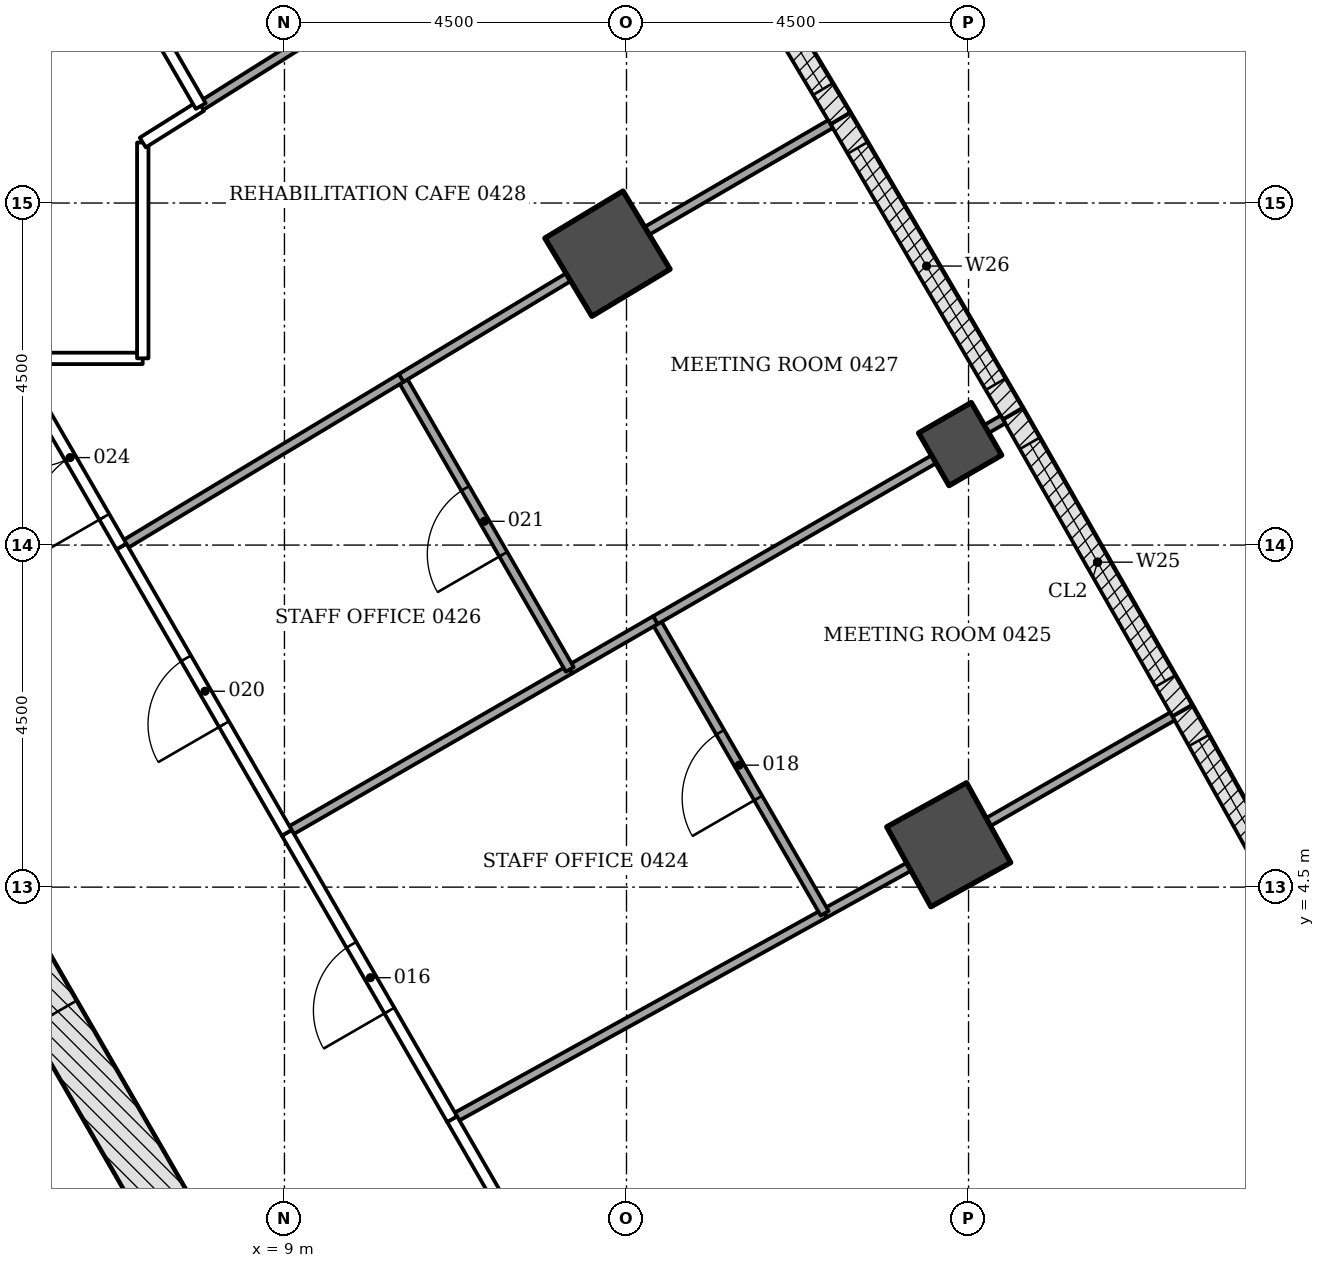
"""IFC4 building model, lengths in metres.
Left out: names, types, materials, properties, quantities, classifications, styles, units other than length and angle.
Written with IfcOpenShell. Run it as: python <this file> out.ifc"""

import sys

from ifc_helpers import new_model, si_unit, direction, frame, frame_2d, origin, origin_2d, place, context, subcontext, project, spatial, rectangle, extrude, element, fill, save


model = new_model("IFC4")
c1 = context("Model", 3, precision=1e-05, world=origin(), true_north=direction((0.0, 1.0)))
c2 = subcontext(c1, "Body", "Model", "MODEL_VIEW")
j1 = project(units=[si_unit("LENGTHUNIT", "METRE"), si_unit("PLANEANGLEUNIT", "RADIAN")], contexts=[c1])
p1 = place(None, origin())
s1 = spatial("IfcSite", under=j1, at=p1, CompositionType="ELEMENT")
p2 = place(p1, origin())
s2 = spatial("IfcBuilding", under=s1, at=p2, CompositionType="ELEMENT")
p3 = place(p2, frame((0.0, 0.0, 19.5)))
s3 = spatial("IfcBuildingStorey", under=s2, at=p3, CompositionType="ELEMENT", Elevation=19.5)
for number, where, z_axis, x_axis in (
    (1, (17.739, 5.058, -0.25), (0.0, 0.0, 1.0), (0.875, 0.484, 0.0)),
    (2, (13.25, 12.834, -0.25), (0.0, 0.0, 1.0), (0.857, 0.516, 0.0)),
):
    element("IfcColumn", number, at=place(p3, frame(where, z_axis=z_axis, x_axis=x_axis)), inside=s3, PredefinedType="COLUMN", context=c2, shape_type="SweptSolid", body=[
        extrude(rectangle(XDim=1.2, YDim=1.2, at=origin_2d()), origin(), (0.0, 0.0, 1.0), 4.55),
    ])
p4 = place(p3, frame((17.89, 10.329, -0.25), z_axis=(0.0, 0.0, 1.0), x_axis=(0.866025403784, 0.5, 0.0)))
e3 = element("IfcColumn", 3, at=p4, inside=s3, PredefinedType="COLUMN", context=c2, shape_type="SweptSolid", body=[
    extrude(rectangle(XDim=0.8, YDim=0.8, at=origin_2d()), origin(), (0.0, 0.0, 1.0), 4.55),
])
p5 = place(p3, frame((10.311, -4.703, -0.25), z_axis=(0.0, 0.0, 1.0), x_axis=(-0.500001446645, 0.866024568562, 0.0)))
e4 = element("IfcWall", 4, at=p5, inside=s3, PredefinedType="SHEAR", context=c2, shape_type="SweptSolid", body=[
    extrude(rectangle(XDim=18.458, YDim=0.7, at=frame_2d((9.229, 0.0))), origin(), (0.0, 0.0, 1.0), 4.55),
])
p6 = place(p5, frame((8.7, 0.0, 0.25)))
e5 = element("IfcOpeningElement", 5, at=p6, cuts=e4, PredefinedType="OPENING", context=c2, shape_type="SweptSolid", body=[
    extrude(rectangle(XDim=1.0, YDim=2.1, at=frame_2d((0.5, 1.05))), frame((0.0, 0.36, 0.0), z_axis=(0.0, -1.0, 0.0), x_axis=(1.0, 0.0, 0.0)), (0.0, 0.0, 1.0), 0.72),
])
p7 = place(p5, frame((4.002, 0.0, 0.25)))
e6 = element("IfcOpeningElement", 6, at=p7, cuts=e4, PredefinedType="OPENING", context=c2, shape_type="SweptSolid", body=[
    extrude(rectangle(XDim=0.9, YDim=2.1, at=frame_2d((0.45, 1.05))), frame((0.0, 0.36, 0.0), z_axis=(0.0, -1.0, 0.0), x_axis=(1.0, 0.0, 0.0)), (0.0, 0.0, 1.0), 0.72),
])
p8 = place(p5, frame((14.093, 0.0, 0.25)))
e7 = element("IfcOpeningElement", 7, at=p8, cuts=e4, PredefinedType="OPENING", context=c2, shape_type="SweptSolid", body=[
    extrude(rectangle(XDim=0.9, YDim=2.1, at=frame_2d((0.45, 1.05))), frame((0.0, 0.36, 0.0), z_axis=(0.0, -1.0, 0.0), x_axis=(1.0, 0.0, 0.0)), (0.0, 0.0, 1.0), 0.72),
])
p9 = place(p3, frame((20.812, 6.82, 0.0), z_axis=(0.0, 0.0, 1.0), x_axis=(0.486606252415, -0.873621402617, 0.0)))
e8 = element("IfcWall", 8, at=p9, inside=s3, PredefinedType="NOTDEFINED", context=c2, shape_type="SweptSolid", body=[
    extrude(rectangle(XDim=4.496, YDim=0.3, at=frame_2d((2.248, 0.0))), origin(), (0.0, 0.0, 1.0), 4.3),
])
p10 = place(p9, frame((0.448, 0.0, 1.5)))
e9 = element("IfcOpeningElement", 9, at=p10, cuts=e8, PredefinedType="OPENING", context=c2, shape_type="SweptSolid", body=[
    extrude(rectangle(XDim=3.6, YDim=1.8, at=frame_2d((1.8, 0.9))), frame((0.0, 0.16, 0.0), z_axis=(0.0, -1.0, 0.0), x_axis=(1.0, 0.0, 0.0)), (0.0, 0.0, 1.0), 0.32),
])
p11 = place(p3, frame((18.583, 10.728, 0.0), z_axis=(0.0, 0.0, 1.0), x_axis=(0.495524760411, -0.868593812907, 0.0)))
e10 = element("IfcWall", 10, at=p11, inside=s3, PredefinedType="NOTDEFINED", context=c2, shape_type="SweptSolid", body=[
    extrude(rectangle(XDim=4.496, YDim=0.3, at=frame_2d((2.248, 0.0))), origin(), (0.0, 0.0, 1.0), 4.3),
])
p12 = place(p11, frame((0.448, 0.0, 1.5)))
e11 = element("IfcOpeningElement", 11, at=p12, cuts=e10, PredefinedType="OPENING", context=c2, shape_type="SweptSolid", body=[
    extrude(rectangle(XDim=3.6, YDim=1.8, at=frame_2d((1.8, 0.9))), frame((0.0, 0.16, 0.0), z_axis=(0.0, -1.0, 0.0), x_axis=(1.0, 0.0, 0.0)), (0.0, 0.0, 1.0), 0.32),
])
p13 = place(p3, frame((16.314, 14.612, 0.0), z_axis=(0.0, 0.0, 1.0), x_axis=(0.50445499627, -0.86343798662, 0.0)))
e12 = element("IfcWall", 12, at=p13, inside=s3, PredefinedType="NOTDEFINED", context=c2, shape_type="SweptSolid", body=[
    extrude(rectangle(XDim=4.496, YDim=0.3, at=frame_2d((2.248, 0.0))), origin(), (0.0, 0.0, 1.0), 4.3),
])
p14 = place(p13, frame((0.448, 0.0, 1.5)))
e13 = element("IfcOpeningElement", 13, at=p14, cuts=e12, PredefinedType="OPENING", context=c2, shape_type="SweptSolid", body=[
    extrude(rectangle(XDim=3.6, YDim=1.8, at=frame_2d((1.8, 0.9))), frame((0.0, 0.16, 0.0), z_axis=(0.0, -1.0, 0.0), x_axis=(1.0, 0.0, 0.0)), (0.0, 0.0, 1.0), 0.32),
])
p15 = place(p3, frame((14.005, 18.472, 0.0), z_axis=(0.0, 0.0, 1.0), x_axis=(0.513257465408, -0.858234684805, 0.0)))
e14 = element("IfcWall", 14, at=p15, inside=s3, PredefinedType="NOTDEFINED", context=c2, shape_type="SweptSolid", body=[
    extrude(rectangle(XDim=4.496, YDim=0.3, at=frame_2d((2.248, 0.0))), origin(), (0.0, 0.0, 1.0), 4.3),
])
p16 = place(p15, frame((0.448, 0.0, 1.5)))
e15 = element("IfcOpeningElement", 15, at=p16, cuts=e14, PredefinedType="OPENING", context=c2, shape_type="SweptSolid", body=[
    extrude(rectangle(XDim=3.6, YDim=1.8, at=frame_2d((1.8, 0.9))), frame((0.0, 0.16, 0.0), z_axis=(0.0, -1.0, 0.0), x_axis=(1.0, 0.0, 0.0)), (0.0, 0.0, 1.0), 0.32),
])
p17 = place(p3, frame((11.205, 1.45, 0.0), z_axis=(0.0, 0.0, 1.0), x_axis=(0.500008243208, -0.866020644514, 0.0)))
e16 = element("IfcWall", 16, at=p17, inside=s3, PredefinedType="PARTITIONING", context=c2, shape_type="SweptSolid", body=[
    extrude(rectangle(XDim=6.902, YDim=0.15, at=frame_2d((3.451, 0.0))), origin(), (0.0, 0.0, 1.0), 3.698),
])
p18 = place(p17, frame((2.55, 0.0, 0.0)))
e17 = element("IfcOpeningElement", 17, at=p18, cuts=e16, PredefinedType="OPENING", context=c2, shape_type="SweptSolid", body=[
    extrude(rectangle(XDim=1.8, YDim=2.1, at=frame_2d((0.9, 1.05))), frame((0.0, 0.085, 0.0), z_axis=(0.0, -1.0, 0.0), x_axis=(1.0, 0.0, 0.0)), (0.0, 0.0, 1.0), 0.17),
])
p19 = place(p3, frame((16.108, 4.155, 0.0), z_axis=(0.0, 0.0, 1.0), x_axis=(-0.875228903622, -0.483708968559, 0.0)))
e18 = element("IfcWall", 18, at=p19, inside=s3, PredefinedType="PARTITIONING", context=c2, shape_type="SweptSolid", body=[
    extrude(rectangle(XDim=5.598, YDim=0.12, at=frame_2d((2.799, 0.0))), origin(), (0.0, 0.0, 1.0), 3.698),
])
p20 = place(p3, frame((17.214, 4.767, 0.0), z_axis=(0.0, 0.0, 1.0), x_axis=(-0.875140294724, -0.483869263904, 0.0)))
e19 = element("IfcWall", 19, at=p20, inside=s3, PredefinedType="PARTITIONING", context=c2, shape_type="SweptSolid", body=[
    extrude(rectangle(XDim=1.263, YDim=0.12, at=frame_2d((0.631, 0.0))), origin(), (0.0, 0.0, 1.0), 3.698),
])
p21 = place(p3, frame((20.682, 6.746, 0.0), z_axis=(0.0, 0.0, 1.0), x_axis=(-0.867283853893, -0.49781393791, 0.0)))
e20 = element("IfcWall", 20, at=p21, inside=s3, PredefinedType="PARTITIONING", context=c2, shape_type="SweptSolid", body=[
    extrude(rectangle(XDim=2.792, YDim=0.12, at=frame_2d((1.396, 0.0))), origin(), (0.0, 0.0, 1.0), 3.683),
])
p22 = place(p3, frame((11.206, 1.447, 0.0), z_axis=(0.0, 0.0, 1.0), x_axis=(-0.50014197282, 0.865943420221, 0.0)))
e21 = element("IfcWall", 21, at=p22, inside=s3, PredefinedType="PARTITIONING", context=c2, shape_type="SweptSolid", body=[
    extrude(rectangle(XDim=4.349, YDim=0.15, at=frame_2d((2.174, 0.0))), origin(), (0.0, 0.0, 1.0), 3.688),
])
p23 = place(p22, frame((1.65, 0.0, 0.0)))
e22 = element("IfcOpeningElement", 22, at=p23, cuts=e21, PredefinedType="OPENING", context=c2, shape_type="SweptSolid", body=[
    extrude(rectangle(XDim=1.0, YDim=2.1, at=frame_2d((0.5, 1.05))), frame((0.0, 0.085, 0.0), z_axis=(0.0, -1.0, 0.0), x_axis=(1.0, 0.0, 0.0)), (0.0, 0.0, 1.0), 0.17),
])
p24 = place(p3, frame((9.03, 5.215, 0.0), z_axis=(0.0, 0.0, 1.0), x_axis=(-0.500070818246, 0.86598451299, 0.0)))
e23 = element("IfcWall", 23, at=p24, inside=s3, PredefinedType="PARTITIONING", context=c2, shape_type="SweptSolid", body=[
    extrude(rectangle(XDim=4.347, YDim=0.15, at=frame_2d((2.174, 0.0))), origin(), (0.0, 0.0, 1.0), 3.688),
])
p25 = place(p24, frame((1.65, 0.0, 0.0)))
e24 = element("IfcOpeningElement", 24, at=p25, cuts=e23, PredefinedType="OPENING", context=c2, shape_type="SweptSolid", body=[
    extrude(rectangle(XDim=1.0, YDim=2.1, at=frame_2d((0.5, 1.05))), frame((0.0, 0.085, 0.0), z_axis=(0.0, -1.0, 0.0), x_axis=(1.0, 0.0, 0.0)), (0.0, 0.0, 1.0), 0.17),
])
p26 = place(p3, frame((6.855, 8.982, 0.0), z_axis=(0.0, 0.0, 1.0), x_axis=(-0.500176439337, 0.865923512519, 0.0)))
e25 = element("IfcWall", 25, at=p26, inside=s3, PredefinedType="PARTITIONING", context=c2, shape_type="SweptSolid", body=[
    extrude(rectangle(XDim=2.855, YDim=0.15, at=frame_2d((1.427, 0.0))), origin(), (0.0, 0.0, 1.0), 3.698),
])
p27 = place(p26, frame((0.45, 0.0, 0.0)))
e26 = element("IfcOpeningElement", 26, at=p27, cuts=e25, PredefinedType="OPENING", context=c2, shape_type="SweptSolid", body=[
    extrude(rectangle(XDim=1.8, YDim=2.1, at=frame_2d((0.9, 1.05))), frame((0.0, 0.085, 0.0), z_axis=(0.0, -1.0, 0.0), x_axis=(1.0, 0.0, 0.0)), (0.0, 0.0, 1.0), 0.17),
])
p28 = place(p3, frame((5.427, 11.456, 0.0), z_axis=(0.0, 0.0, 1.0), x_axis=(1.0, 0.0, 0.0)))
e27 = element("IfcWall", 27, at=p28, inside=s3, PredefinedType="PARTITIONING", context=c2, shape_type="SweptSolid", body=[
    extrude(rectangle(XDim=1.708, YDim=0.15, at=frame_2d((0.854, 0.0))), origin(), (0.0, 0.0, 1.0), 4.3),
])
p29 = place(p3, frame((7.136, 11.457, 0.0), z_axis=(0.0, 0.0, 1.0), x_axis=(0.0, 1.0, 0.0)))
e28 = element("IfcWall", 28, at=p29, inside=s3, PredefinedType="PARTITIONING", context=c2, shape_type="SweptSolid", body=[
    extrude(rectangle(XDim=2.839, YDim=0.15, at=frame_2d((1.419, 0.0))), origin(), (0.0, 0.0, 1.0), 3.843),
])
p30 = place(p3, frame((7.136, 14.296, 0.0), z_axis=(0.0, 0.0, 1.0), x_axis=(0.84681367047, 0.531889657265, 0.0)))
e29 = element("IfcWall", 29, at=p30, inside=s3, PredefinedType="PARTITIONING", context=c2, shape_type="SweptSolid", body=[
    extrude(rectangle(XDim=0.905, YDim=0.15, at=frame_2d((0.452, 0.0))), origin(), (0.0, 0.0, 1.0), 3.843),
])
p31 = place(p3, frame((7.899, 14.776, 0.0), z_axis=(0.0, 0.0, 1.0), x_axis=(-0.500392307633, 0.865798786359, 0.0)))
e30 = element("IfcWall", 30, at=p31, inside=s3, PredefinedType="PARTITIONING", context=c2, shape_type="SweptSolid", body=[
    extrude(rectangle(XDim=1.525, YDim=0.15, at=frame_2d((0.762, 0.0))), origin(), (0.0, 0.0, 1.0), 3.843),
])
p32 = place(p3, frame((16.107, 4.156, 0.0), z_axis=(0.0, 0.0, 1.0), x_axis=(-0.499836357881, 0.866119861994, 0.0)))
e31 = element("IfcWall", 31, at=p32, inside=s3, PredefinedType="PARTITIONING", context=c2, shape_type="SweptSolid", body=[
    extrude(rectangle(XDim=4.453, YDim=0.12, at=frame_2d((2.227, 0.0))), origin(), (0.0, 0.0, 1.0), 3.688),
])
p33 = place(p32, frame((1.75, 0.0, 0.0)))
e32 = element("IfcOpeningElement", 32, at=p33, cuts=e31, PredefinedType="OPENING", context=c2, shape_type="SweptSolid", body=[
    extrude(rectangle(XDim=1.0, YDim=2.1, at=frame_2d((0.5, 1.05))), frame((0.0, 0.07, 0.0), z_axis=(0.0, -1.0, 0.0), x_axis=(1.0, 0.0, 0.0)), (0.0, 0.0, 1.0), 0.14),
])
p34 = place(p3, frame((12.755, 7.363, 0.0), z_axis=(0.0, 0.0, 1.0), x_axis=(-0.866173292352, -0.499743761959, 0.0)))
e33 = element("IfcWall", 33, at=p34, inside=s3, PredefinedType="PARTITIONING", context=c2, shape_type="SweptSolid", body=[
    extrude(rectangle(XDim=4.298, YDim=0.12, at=frame_2d((2.149, 0.0))), origin(), (0.0, 0.0, 1.0), 3.688),
])
p35 = place(p3, frame((13.881, 8.013, 0.0), z_axis=(0.0, 0.0, 1.0), x_axis=(-0.866223138365, -0.499657357156, 0.0)))
e34 = element("IfcWall", 34, at=p35, inside=s3, PredefinedType="PARTITIONING", context=c2, shape_type="SweptSolid", body=[
    extrude(rectangle(XDim=1.299, YDim=0.12, at=frame_2d((0.649, 0.0))), origin(), (0.0, 0.0, 1.0), 3.688),
])
p36 = place(p3, frame((17.543, 10.128, 0.0), z_axis=(0.0, 0.0, 1.0), x_axis=(-0.865942311451, -0.500143892533, 0.0)))
e35 = element("IfcWall", 35, at=p36, inside=s3, PredefinedType="PARTITIONING", context=c2, shape_type="SweptSolid", body=[
    extrude(rectangle(XDim=4.229, YDim=0.12, at=frame_2d((2.114, 0.0))), origin(), (0.0, 0.0, 1.0), 3.18),
])
p37 = place(p3, frame((18.454, 10.653, 0.0), z_axis=(0.0, 0.0, 1.0), x_axis=(-0.866558586415, -0.499075361355, 0.0)))
e36 = element("IfcWall", 36, at=p37, inside=s3, PredefinedType="PARTITIONING", context=c2, shape_type="SweptSolid", body=[
    extrude(rectangle(XDim=0.25, YDim=0.12, at=frame_2d((0.125, 0.0))), origin(), (0.0, 0.0, 1.0), 4.3),
])
p38 = place(p3, frame((12.754, 7.364, 0.0), z_axis=(0.0, 0.0, 1.0), x_axis=(-0.499862428325, 0.86610481626, 0.0)))
e37 = element("IfcWall", 37, at=p38, inside=s3, PredefinedType="PARTITIONING", context=c2, shape_type="SweptSolid", body=[
    extrude(rectangle(XDim=4.429, YDim=0.12, at=frame_2d((2.214, 0.0))), origin(), (0.0, 0.0, 1.0), 3.688),
])
p39 = place(p38, frame((1.75, 0.0, 0.0)))
e38 = element("IfcOpeningElement", 38, at=p39, cuts=e37, PredefinedType="OPENING", context=c2, shape_type="SweptSolid", body=[
    extrude(rectangle(XDim=1.0, YDim=2.1, at=frame_2d((0.5, 1.05))), frame((0.0, 0.07, 0.0), z_axis=(0.0, -1.0, 0.0), x_axis=(1.0, 0.0, 0.0)), (0.0, 0.0, 1.0), 0.14),
])
p40 = place(p3, frame((10.544, 11.203, 0.0), z_axis=(0.0, 0.0, 1.0), x_axis=(-0.85659577265, -0.515988064084, 0.0)))
e39 = element("IfcWall", 39, at=p40, inside=s3, PredefinedType="PARTITIONING", context=c2, shape_type="SweptSolid", body=[
    extrude(rectangle(XDim=4.304, YDim=0.12, at=frame_2d((2.152, 0.0))), origin(), (0.0, 0.0, 1.0), 3.698),
])
p41 = place(p3, frame((12.736, 12.524, 0.0), z_axis=(0.0, 0.0, 1.0), x_axis=(-0.85666145055, -0.515879015993, 0.0)))
e40 = element("IfcWall", 40, at=p41, inside=s3, PredefinedType="PARTITIONING", context=c2, shape_type="SweptSolid", body=[
    extrude(rectangle(XDim=2.568, YDim=0.12, at=frame_2d((1.284, 0.0))), origin(), (0.0, 0.0, 1.0), 3.698),
])
p42 = place(p3, frame((16.183, 14.538, 0.0), z_axis=(0.0, 0.0, 1.0), x_axis=(-0.864576979504, -0.50250039454, 0.0)))
e41 = element("IfcWall", 41, at=p42, inside=s3, PredefinedType="PARTITIONING", context=c2, shape_type="SweptSolid", body=[
    extrude(rectangle(XDim=2.792, YDim=0.12, at=frame_2d((1.396, 0.0))), origin(), (0.0, 0.0, 1.0), 3.683),
])
p43 = place(p3, frame((10.898, 16.658, 0.0), z_axis=(0.0, 0.0, 1.0), x_axis=(-0.846864700387, -0.531808404634, 0.0)))
e42 = element("IfcWall", 42, at=p43, inside=s3, PredefinedType="PARTITIONING", context=c2, shape_type="SweptSolid", body=[
    extrude(rectangle(XDim=3.539, YDim=0.12, at=frame_2d((1.77, 0.0))), origin(), (0.0, 0.0, 1.0), 3.18),
])
p44 = place(p10, origin())
e43 = element("IfcWindow", 43, at=p44, inside=s3, PartitioningType="SINGLE_PANEL", PredefinedType="WINDOW", context=c2, shape_type="SweptSolid", body=[
    extrude(rectangle(XDim=3.6, YDim=1.8, at=frame_2d((1.8, 0.9))), frame((0.0, 0.03, 0.0), z_axis=(0.0, -1.0, 0.0), x_axis=(1.0, 0.0, 0.0)), (0.0, 0.0, 1.0), 0.06),
])
fill(e9, e43)
p45 = place(p12, origin())
e44 = element("IfcWindow", 44, at=p45, inside=s3, PartitioningType="SINGLE_PANEL", PredefinedType="WINDOW", context=c2, shape_type="SweptSolid", body=[
    extrude(rectangle(XDim=3.6, YDim=1.8, at=frame_2d((1.8, 0.9))), frame((0.0, 0.03, 0.0), z_axis=(0.0, -1.0, 0.0), x_axis=(1.0, 0.0, 0.0)), (0.0, 0.0, 1.0), 0.06),
])
fill(e11, e44)
p46 = place(p14, origin())
e45 = element("IfcWindow", 45, at=p46, inside=s3, PartitioningType="SINGLE_PANEL", PredefinedType="WINDOW", context=c2, shape_type="SweptSolid", body=[
    extrude(rectangle(XDim=3.6, YDim=1.8, at=frame_2d((1.8, 0.9))), frame((0.0, 0.03, 0.0), z_axis=(0.0, -1.0, 0.0), x_axis=(1.0, 0.0, 0.0)), (0.0, 0.0, 1.0), 0.06),
])
fill(e13, e45)
p47 = place(p16, origin())
e46 = element("IfcWindow", 46, at=p47, inside=s3, PartitioningType="SINGLE_PANEL", PredefinedType="WINDOW", context=c2, shape_type="SweptSolid", body=[
    extrude(rectangle(XDim=3.6, YDim=1.8, at=frame_2d((1.8, 0.9))), frame((0.0, 0.03, 0.0), z_axis=(0.0, -1.0, 0.0), x_axis=(1.0, 0.0, 0.0)), (0.0, 0.0, 1.0), 0.06),
])
fill(e15, e46)
p48 = place(p6, origin())
e47 = element("IfcDoor", 47, at=p48, inside=s3, OperationType="SINGLE_SWING_LEFT", PredefinedType="DOOR", context=c2, shape_type="SweptSolid", body=[
    extrude(rectangle(XDim=1.0, YDim=2.1, at=frame_2d((0.5, 1.05))), frame((0.0, 0.075, 0.0), z_axis=(0.0, -1.0, 0.0), x_axis=(1.0, 0.0, 0.0)), (0.0, 0.0, 1.0), 0.15),
])
fill(e5, e47)
p49 = place(p23, origin())
e48 = element("IfcDoor", 48, at=p49, inside=s3, OperationType="SINGLE_SWING_RIGHT", PredefinedType="DOOR", context=c2, shape_type="SweptSolid", body=[
    extrude(rectangle(XDim=1.0, YDim=2.1, at=frame_2d((0.5, 1.05))), frame((0.0, 0.025, 0.0), z_axis=(0.0, -1.0, 0.0), x_axis=(1.0, 0.0, 0.0)), (0.0, 0.0, 1.0), 0.05),
])
fill(e22, e48)
p50 = place(p33, origin())
e49 = element("IfcDoor", 49, at=p50, inside=s3, OperationType="SINGLE_SWING_LEFT", PredefinedType="DOOR", context=c2, shape_type="SweptSolid", body=[
    extrude(rectangle(XDim=1.0, YDim=2.1, at=frame_2d((0.5, 1.05))), frame((0.0, 0.025, 0.0), z_axis=(0.0, -1.0, 0.0), x_axis=(1.0, 0.0, 0.0)), (0.0, 0.0, 1.0), 0.05),
])
fill(e32, e49)
p51 = place(p25, origin())
e50 = element("IfcDoor", 50, at=p51, inside=s3, OperationType="SINGLE_SWING_RIGHT", PredefinedType="DOOR", context=c2, shape_type="SweptSolid", body=[
    extrude(rectangle(XDim=1.0, YDim=2.1, at=frame_2d((0.5, 1.05))), frame((0.0, 0.025, 0.0), z_axis=(0.0, -1.0, 0.0), x_axis=(1.0, 0.0, 0.0)), (0.0, 0.0, 1.0), 0.05),
])
fill(e24, e50)
p52 = place(p39, origin())
e51 = element("IfcDoor", 51, at=p52, inside=s3, OperationType="SINGLE_SWING_LEFT", PredefinedType="DOOR", context=c2, shape_type="SweptSolid", body=[
    extrude(rectangle(XDim=1.0, YDim=2.1, at=frame_2d((0.5, 1.05))), frame((0.0, 0.025, 0.0), z_axis=(0.0, -1.0, 0.0), x_axis=(1.0, 0.0, 0.0)), (0.0, 0.0, 1.0), 0.05),
])
fill(e38, e51)
p53 = place(p27, origin())
e52 = element("IfcDoor", 52, at=p53, inside=s3, OperationType="DOUBLE_DOOR_SINGLE_SWING", PredefinedType="DOOR", context=c2, shape_type="SweptSolid", body=[
    extrude(rectangle(XDim=1.8, YDim=2.1, at=frame_2d((0.9, 1.05))), frame((0.0, 0.025, 0.0), z_axis=(0.0, -1.0, 0.0), x_axis=(1.0, 0.0, 0.0)), (0.0, 0.0, 1.0), 0.05),
])
fill(e26, e52)
save(model, sys.argv[1])
